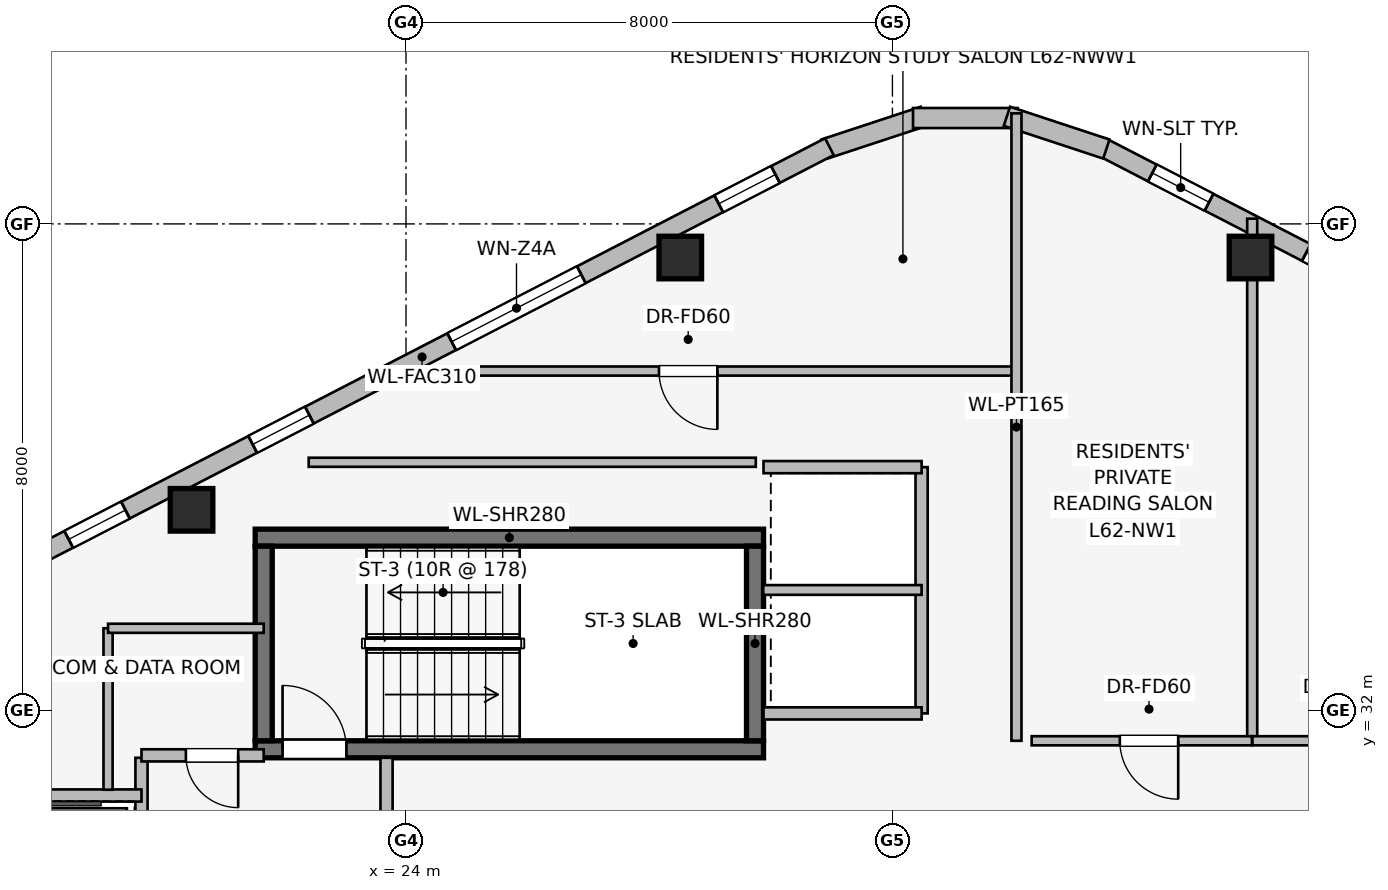
"""IFC4 building model, lengths in metres.
Left out: names, types, materials, properties, quantities, classifications, styles, units other than length and angle.
Written with IfcOpenShell. Run it as: python <this file> out.ifc"""

import sys

from ifc_helpers import new_model, si_unit, direction, frame, frame_2d, origin, origin_2d, place, context, subcontext, project, spatial, rectangle, extrude, element, fill, save


model = new_model("IFC4")
c1 = context("Model", 3, precision=1e-05, world=origin(), true_north=direction((0.0, 1.0)))
c2 = subcontext(c1, "Body", "Model", "MODEL_VIEW")
j1 = project(units=[si_unit("LENGTHUNIT", "METRE"), si_unit("PLANEANGLEUNIT", "RADIAN")], contexts=[c1])
p1 = place(None, origin())
s1 = spatial("IfcSite", under=j1, at=p1, CompositionType="ELEMENT")
p2 = place(p1, origin())
s2 = spatial("IfcBuilding", under=s1, at=p2, CompositionType="ELEMENT")
p3 = place(p2, frame((0.0, 0.0, 227.7)))
s3 = spatial("IfcBuildingStorey", under=s2, at=p3, CompositionType="ELEMENT", Elevation=227.7)
p4 = place(p3, frame((21.52, 31.36, 0.0), z_axis=(0.0, 0.0, 1.0), x_axis=(1.0, 0.0, 0.0)))
e1 = element("IfcWall", 1, at=p4, inside=s3, PredefinedType="SHEAR", context=c2, shape_type="SweptSolid", body=[
    extrude(rectangle(XDim=8.36, YDim=0.28, at=frame_2d((4.18, 0.0))), origin(), (0.0, 0.0, 1.0), 3.55),
])
p5 = place(p4, frame((0.45, 0.0, 0.0)))
e2 = element("IfcOpeningElement", 2, at=p5, cuts=e1, PredefinedType="OPENING", context=c2, shape_type="SweptSolid", body=[
    extrude(rectangle(XDim=1.05, YDim=2.0, at=frame_2d((0.525, 1.0))), frame((0.0, 0.15, 0.0), z_axis=(0.0, -1.0, 0.0), x_axis=(1.0, 0.0, 0.0)), (0.0, 0.0, 1.0), 0.3),
])
p6 = place(p3, frame((29.88, 34.84, 0.0), z_axis=(0.0, 0.0, 1.0), x_axis=(-1.0, 0.0, 0.0)))
e3 = element("IfcWall", 3, at=p6, inside=s3, PredefinedType="SHEAR", context=c2, shape_type="SweptSolid", body=[
    extrude(rectangle(XDim=8.36, YDim=0.28, at=frame_2d((4.18, 0.0))), origin(), (0.0, 0.0, 1.0), 3.55),
])
for number, where, z_axis, x_axis in (
    (4, (21.66, 34.7, 0.0), (0.0, 0.0, 1.0), (0.0, -1.0, 0.0)),
    (5, (29.74, 31.5, 0.0), (0.0, 0.0, 1.0), (0.0, 1.0, 0.0)),
):
    element("IfcWall", number, at=place(p3, frame(where, z_axis=z_axis, x_axis=x_axis)), inside=s3, PredefinedType="SHEAR", context=c2, shape_type="SweptSolid", body=[
        extrude(rectangle(XDim=3.2, YDim=0.28, at=frame_2d((1.6, 0.0))), origin(), (0.0, 0.0, 1.0), 3.55),
    ])
for number, where, z_axis, x_axis in (
    (6, (37.889, 39.447, 0.0), (0.0, 0.0, 1.0), (1.0, 0.0, 0.0)),
    (7, (28.511, 39.447, 0.0), (0.0, 0.0, 1.0), (1.0, 0.0, 0.0)),
    (8, (20.473, 35.298, 0.0), (0.0, 0.0, 1.0), (1.0, 0.0, 0.0)),
):
    element("IfcColumn", number, at=place(p3, frame(where, z_axis=z_axis, x_axis=x_axis)), inside=s3, PredefinedType="COLUMN", context=c2, shape_type="SweptSolid", body=[
        extrude(rectangle(XDim=0.7, YDim=0.7, at=origin_2d()), origin(), (0.0, 0.0, 1.0), 3.55),
    ])
p7 = place(p3, frame((35.437, 41.27, 0.0), z_axis=(0.0, 0.0, 1.0), x_axis=(0.888581481622, -0.458718814218, 0.0)))
e9 = element("IfcWall", 9, at=p7, inside=s3, PredefinedType="STANDARD", context=c2, shape_type="SweptSolid", body=[
    extrude(rectangle(XDim=15.077, YDim=0.31, at=frame_2d((7.539, 0.0))), origin(), (0.0, 0.0, 1.0), 3.29),
])
p8 = place(p7, frame((6.988, 0.0, 0.0)))
e10 = element("IfcOpeningElement", 10, at=p8, cuts=e9, PredefinedType="OPENING", context=c2, shape_type="SweptSolid", body=[
    extrude(rectangle(XDim=1.1, YDim=2.04, at=frame_2d((0.55, 1.02))), frame((0.0, 0.165, 0.0), z_axis=(0.0, -1.0, 0.0), x_axis=(1.0, 0.0, 0.0)), (0.0, 0.0, 1.0), 0.33),
])
p9 = place(p7, frame((0.942, 0.0, 0.75)))
e11 = element("IfcOpeningElement", 11, at=p9, cuts=e9, PredefinedType="OPENING", context=c2, shape_type="SweptSolid", body=[
    extrude(rectangle(XDim=1.05, YDim=1.4, at=frame_2d((0.525, 0.7))), frame((0.0, 0.165, 0.0), z_axis=(0.0, -1.0, 0.0), x_axis=(1.0, 0.0, 0.0)), (0.0, 0.0, 1.0), 0.33),
])
p10 = place(p7, frame((3.793, 0.0, 0.75)))
e12 = element("IfcOpeningElement", 12, at=p10, cuts=e9, PredefinedType="OPENING", context=c2, shape_type="SweptSolid", body=[
    extrude(rectangle(XDim=1.05, YDim=1.4, at=frame_2d((0.525, 0.7))), frame((0.0, 0.165, 0.0), z_axis=(0.0, -1.0, 0.0), x_axis=(1.0, 0.0, 0.0)), (0.0, 0.0, 1.0), 0.33),
])
p11 = place(p7, frame((5.36, 0.0, 0.75)))
e13 = element("IfcOpeningElement", 13, at=p11, cuts=e9, PredefinedType="OPENING", context=c2, shape_type="SweptSolid", body=[
    extrude(rectangle(XDim=1.05, YDim=1.4, at=frame_2d((0.525, 0.7))), frame((0.0, 0.165, 0.0), z_axis=(0.0, -1.0, 0.0), x_axis=(1.0, 0.0, 0.0)), (0.0, 0.0, 1.0), 0.33),
])
p12 = place(p7, frame((8.774, 0.0, 0.75)))
e14 = element("IfcOpeningElement", 14, at=p12, cuts=e9, PredefinedType="OPENING", context=c2, shape_type="SweptSolid", body=[
    extrude(rectangle(XDim=2.4, YDim=1.6, at=frame_2d((1.2, 0.8))), frame((0.0, 0.165, 0.0), z_axis=(0.0, -1.0, 0.0), x_axis=(1.0, 0.0, 0.0)), (0.0, 0.0, 1.0), 0.33),
])
p13 = place(p7, frame((13.029, 0.0, 0.75)))
e15 = element("IfcOpeningElement", 15, at=p13, cuts=e9, PredefinedType="OPENING", context=c2, shape_type="SweptSolid", body=[
    extrude(rectangle(XDim=1.05, YDim=1.4, at=frame_2d((0.525, 0.7))), frame((0.0, 0.165, 0.0), z_axis=(0.0, -1.0, 0.0), x_axis=(1.0, 0.0, 0.0)), (0.0, 0.0, 1.0), 0.33),
])
p14 = place(p3, frame((30.882, 41.231, 0.0), z_axis=(0.0, 0.0, 1.0), x_axis=(0.949713440491, 0.313120393699, 0.0)))
e16 = element("IfcWall", 16, at=p14, inside=s3, PredefinedType="STANDARD", context=c2, shape_type="SweptSolid", body=[
    extrude(rectangle(XDim=1.722, YDim=0.33, at=frame_2d((0.861, 0.0))), origin(), (0.0, 0.0, 1.0), 3.29),
])
p15 = place(p3, frame((32.339, 41.741, 0.0), z_axis=(0.0, 0.0, 1.0), x_axis=(1.0, 0.0, 0.0)))
e17 = element("IfcWall", 17, at=p15, inside=s3, PredefinedType="STANDARD", context=c2, shape_type="SweptSolid", body=[
    extrude(rectangle(XDim=1.722, YDim=0.33, at=frame_2d((0.861, 0.0))), origin(), (0.0, 0.0, 1.0), 3.29),
])
p16 = place(p3, frame((33.883, 41.77, 0.0), z_axis=(0.0, 0.0, 1.0), x_axis=(0.949713440491, -0.313120393699, 0.0)))
e18 = element("IfcWall", 18, at=p16, inside=s3, PredefinedType="STANDARD", context=c2, shape_type="SweptSolid", body=[
    extrude(rectangle(XDim=1.722, YDim=0.33, at=frame_2d((0.861, 0.0))), origin(), (0.0, 0.0, 1.0), 3.29),
])
p17 = place(p3, frame((17.566, 34.354, 0.0), z_axis=(0.0, 0.0, 1.0), x_axis=(0.888581481622, 0.458718814218, 0.0)))
e19 = element("IfcWall", 19, at=p17, inside=s3, PredefinedType="STANDARD", context=c2, shape_type="SweptSolid", body=[
    extrude(rectangle(XDim=15.077, YDim=0.31, at=frame_2d((7.539, 0.0))), origin(), (0.0, 0.0, 1.0), 3.29),
])
p18 = place(p17, frame((0.998, 0.0, 0.75)))
e20 = element("IfcOpeningElement", 20, at=p18, cuts=e19, PredefinedType="OPENING", context=c2, shape_type="SweptSolid", body=[
    extrude(rectangle(XDim=1.05, YDim=1.4, at=frame_2d((0.525, 0.7))), frame((0.0, 0.165, 0.0), z_axis=(0.0, -1.0, 0.0), x_axis=(1.0, 0.0, 0.0)), (0.0, 0.0, 1.0), 0.33),
])
p19 = place(p17, frame((4.403, 0.0, 0.75)))
e21 = element("IfcOpeningElement", 21, at=p19, cuts=e19, PredefinedType="OPENING", context=c2, shape_type="SweptSolid", body=[
    extrude(rectangle(XDim=1.05, YDim=1.4, at=frame_2d((0.525, 0.7))), frame((0.0, 0.165, 0.0), z_axis=(0.0, -1.0, 0.0), x_axis=(1.0, 0.0, 0.0)), (0.0, 0.0, 1.0), 0.33),
])
p20 = place(p17, frame((8.086, 0.0, 0.75)))
e22 = element("IfcOpeningElement", 22, at=p20, cuts=e19, PredefinedType="OPENING", context=c2, shape_type="SweptSolid", body=[
    extrude(rectangle(XDim=2.4, YDim=1.6, at=frame_2d((1.2, 0.8))), frame((0.0, 0.165, 0.0), z_axis=(0.0, -1.0, 0.0), x_axis=(1.0, 0.0, 0.0)), (0.0, 0.0, 1.0), 0.33),
])
p21 = place(p17, frame((13.029, 0.0, 0.75)))
e23 = element("IfcOpeningElement", 23, at=p21, cuts=e19, PredefinedType="OPENING", context=c2, shape_type="SweptSolid", body=[
    extrude(rectangle(XDim=1.05, YDim=1.4, at=frame_2d((0.525, 0.7))), frame((0.0, 0.165, 0.0), z_axis=(0.0, -1.0, 0.0), x_axis=(1.0, 0.0, 0.0)), (0.0, 0.0, 1.0), 0.33),
])
p22 = place(p3, frame((19.65, 25.68, 0.0), z_axis=(0.0, 0.0, 1.0), x_axis=(0.0, 1.0, 0.0)))
e24 = element("IfcWall", 24, at=p22, inside=s3, PredefinedType="PARTITIONING", context=c2, shape_type="SweptSolid", body=[
    extrude(rectangle(XDim=5.54, YDim=0.2, at=frame_2d((2.77, 0.0))), origin(), (0.0, 0.0, 1.0), 3.29),
])
p23 = place(p22, frame((0.62, 0.0, 0.0)))
e25 = element("IfcOpeningElement", 25, at=p23, cuts=e24, PredefinedType="OPENING", context=c2, shape_type="SweptSolid", body=[
    extrude(rectangle(XDim=1.1, YDim=2.2, at=frame_2d((0.55, 1.1))), frame((0.0, 0.11, 0.0), z_axis=(0.0, -1.0, 0.0), x_axis=(1.0, 0.0, 0.0)), (0.0, 0.0, 1.0), 0.22),
])
p24 = place(p22, frame((3.12, 0.0, 0.0)))
e26 = element("IfcOpeningElement", 26, at=p24, cuts=e24, PredefinedType="OPENING", context=c2, shape_type="SweptSolid", body=[
    extrude(rectangle(XDim=1.1, YDim=2.2, at=frame_2d((0.55, 1.1))), frame((0.0, 0.11, 0.0), z_axis=(0.0, -1.0, 0.0), x_axis=(1.0, 0.0, 0.0)), (0.0, 0.0, 1.0), 0.22),
])
p25 = place(p3, frame((23.68, 25.68, 0.0), z_axis=(0.0, 0.0, 1.0), x_axis=(0.0, 1.0, 0.0)))
e27 = element("IfcWall", 27, at=p25, inside=s3, PredefinedType="PARTITIONING", context=c2, shape_type="SweptSolid", body=[
    extrude(rectangle(XDim=5.54, YDim=0.2, at=frame_2d((2.77, 0.0))), origin(), (0.0, 0.0, 1.0), 3.29),
])
p26 = place(p25, frame((1.8, 0.0, 0.0)))
e28 = element("IfcOpeningElement", 28, at=p26, cuts=e27, PredefinedType="OPENING", context=c2, shape_type="SweptSolid", body=[
    extrude(rectangle(XDim=1.05, YDim=2.0, at=frame_2d((0.525, 1.0))), frame((0.0, 0.11, 0.0), z_axis=(0.0, -1.0, 0.0), x_axis=(1.0, 0.0, 0.0)), (0.0, 0.0, 1.0), 0.22),
])
p27 = place(p3, frame((21.66, 31.26, 0.0), z_axis=(0.0, 0.0, 1.0), x_axis=(-1.0, 0.0, 0.0)))
e29 = element("IfcWall", 29, at=p27, inside=s3, PredefinedType="PARTITIONING", context=c2, shape_type="SweptSolid", body=[
    extrude(rectangle(XDim=2.01, YDim=0.2, at=frame_2d((1.005, 0.0))), origin(), (0.0, 0.0, 1.0), 3.29),
])
p28 = place(p27, frame((0.42, 0.0, 0.0)))
e30 = element("IfcOpeningElement", 30, at=p28, cuts=e29, PredefinedType="OPENING", context=c2, shape_type="SweptSolid", body=[
    extrude(rectangle(XDim=0.86, YDim=2.0, at=frame_2d((0.43, 1.0))), frame((0.0, 0.11, 0.0), z_axis=(0.0, -1.0, 0.0), x_axis=(1.0, 0.0, 0.0)), (0.0, 0.0, 1.0), 0.22),
])
p29 = place(p3, frame((19.65, 30.6, 0.0), z_axis=(0.0, 0.0, 1.0), x_axis=(-1.0, 0.0, 0.0)))
e31 = element("IfcWall", 31, at=p29, inside=s3, PredefinedType="PARTITIONING", context=c2, shape_type="SweptSolid", body=[
    extrude(rectangle(XDim=2.5, YDim=0.2, at=frame_2d((1.25, 0.0))), origin(), (0.0, 0.0, 1.0), 2.19),
])
p30 = place(p3, frame((32.48, 31.95, 0.0), z_axis=(0.0, 0.0, 1.0), x_axis=(0.0, 1.0, 0.0)))
e32 = element("IfcWall", 32, at=p30, inside=s3, PredefinedType="PARTITIONING", context=c2, shape_type="SweptSolid", body=[
    extrude(rectangle(XDim=4.05, YDim=0.2, at=frame_2d((2.025, 0.0))), origin(), (0.0, 0.0, 1.0), 3.29),
])
for number, where, z_axis, x_axis in (
    (33, (29.88, 36.0, 0.0), (0.0, 0.0, 1.0), (1.0, 0.0, 0.0)),
    (34, (32.48, 31.95, 0.0), (0.0, 0.0, 1.0), (-1.0, 0.0, 0.0)),
):
    element("IfcWall", number, at=place(p3, frame(where, z_axis=z_axis, x_axis=x_axis)), inside=s3, PredefinedType="PARTITIONING", context=c2, shape_type="SweptSolid", body=[
        extrude(rectangle(XDim=2.6, YDim=0.2, at=frame_2d((1.3, 0.0))), origin(), (0.0, 0.0, 1.0), 3.29),
    ])
p31 = place(p3, frame((29.875, 33.98, 0.0), z_axis=(0.0, 0.0, 1.0), x_axis=(1.0, 0.0, 0.0)))
e35 = element("IfcWall", 35, at=p31, inside=s3, PredefinedType="PARTITIONING", context=c2, shape_type="SweptSolid", body=[
    extrude(rectangle(XDim=2.605, YDim=0.16, at=frame_2d((1.302, 0.0))), origin(), (0.0, 0.0, 1.0), 3.29),
])
p32 = place(p3, frame((19.1, 33.35, 0.0), z_axis=(0.0, 0.0, 1.0), x_axis=(0.0, -1.0, 0.0)))
e36 = element("IfcWall", 36, at=p32, inside=s3, PredefinedType="PARTITIONING", context=c2, shape_type="SweptSolid", body=[
    extrude(rectangle(XDim=2.655, YDim=0.15, at=frame_2d((1.328, 0.0))), origin(), (0.0, 0.0, 1.0), 3.29),
])
p33 = place(p3, frame((21.66, 33.35, 0.0), z_axis=(0.0, 0.0, 1.0), x_axis=(-1.0, 0.0, 0.0)))
e37 = element("IfcWall", 37, at=p33, inside=s3, PredefinedType="PARTITIONING", context=c2, shape_type="SweptSolid", body=[
    extrude(rectangle(XDim=2.56, YDim=0.15, at=frame_2d((1.28, 0.0))), origin(), (0.0, 0.0, 1.0), 3.29),
])
p34 = place(p3, frame((34.0, 37.58, 0.0), z_axis=(0.0, 0.0, 1.0), x_axis=(-1.0, 0.0, 0.0)))
e38 = element("IfcWall", 38, at=p34, inside=s3, PredefinedType="PARTITIONING", context=c2, shape_type="SweptSolid", body=[
    extrude(rectangle(XDim=10.501, YDim=0.15, at=frame_2d((5.25, 0.0))), origin(), (0.0, 0.0, 1.0), 2.682),
])
p35 = place(p34, frame((4.879, 0.0, 0.0)))
e39 = element("IfcOpeningElement", 39, at=p35, cuts=e38, PredefinedType="OPENING", context=c2, shape_type="SweptSolid", body=[
    extrude(rectangle(XDim=0.96, YDim=2.0, at=frame_2d((0.48, 1.0))), frame((0.0, 0.085, 0.0), z_axis=(0.0, -1.0, 0.0), x_axis=(1.0, 0.0, 0.0)), (0.0, 0.0, 1.0), 0.17),
])
p36 = place(p3, frame((34.04, 31.5, 0.0), z_axis=(0.0, 0.0, 1.0), x_axis=(0.0, 1.0, 0.0)))
e40 = element("IfcWall", 40, at=p36, inside=s3, PredefinedType="PARTITIONING", context=c2, shape_type="SweptSolid", body=[
    extrude(rectangle(XDim=10.318, YDim=0.165, at=frame_2d((5.159, 0.0))), origin(), (0.0, 0.0, 1.0), 3.29),
])
p37 = place(p3, frame((37.917, 31.51, 0.0), z_axis=(0.0, 0.0, 1.0), x_axis=(0.0, 1.0, 0.0)))
e41 = element("IfcWall", 41, at=p37, inside=s3, PredefinedType="PARTITIONING", context=c2, shape_type="SweptSolid", body=[
    extrude(rectangle(XDim=8.576, YDim=0.165, at=frame_2d((4.288, 0.0))), origin(), (0.0, 0.0, 1.0), 2.679),
])
p38 = place(p3, frame((37.912, 31.5, 0.0), z_axis=(0.0, 0.0, 1.0), x_axis=(-1.0, 0.0, 0.0)))
e42 = element("IfcWall", 42, at=p38, inside=s3, PredefinedType="PARTITIONING", context=c2, shape_type="SweptSolid", body=[
    extrude(rectangle(XDim=3.622, YDim=0.15, at=frame_2d((1.811, 0.0))), origin(), (0.0, 0.0, 1.0), 3.29),
])
p39 = place(p38, frame((1.212, 0.0, 0.0)))
e43 = element("IfcOpeningElement", 43, at=p39, cuts=e42, PredefinedType="OPENING", context=c2, shape_type="SweptSolid", body=[
    extrude(rectangle(XDim=0.96, YDim=2.0, at=frame_2d((0.48, 1.0))), frame((0.0, 0.085, 0.0), z_axis=(0.0, -1.0, 0.0), x_axis=(1.0, 0.0, 0.0)), (0.0, 0.0, 1.0), 0.17),
])
p40 = place(p3, frame((41.45, 31.5, 0.0), z_axis=(0.0, 0.0, 1.0), x_axis=(-1.0, 0.0, 0.0)))
e44 = element("IfcWall", 44, at=p40, inside=s3, PredefinedType="PARTITIONING", context=c2, shape_type="SweptSolid", body=[
    extrude(rectangle(XDim=3.528, YDim=0.15, at=frame_2d((1.764, 0.0))), origin(), (0.0, 0.0, 1.0), 3.29),
])
p41 = place(p40, frame((1.524, 0.0, 0.0)))
e45 = element("IfcOpeningElement", 45, at=p41, cuts=e44, PredefinedType="OPENING", context=c2, shape_type="SweptSolid", body=[
    extrude(rectangle(XDim=0.96, YDim=2.0, at=frame_2d((0.48, 1.0))), frame((0.0, 0.085, 0.0), z_axis=(0.0, -1.0, 0.0), x_axis=(1.0, 0.0, 0.0)), (0.0, 0.0, 1.0), 0.17),
])
p42 = place(p3, frame((29.753, 36.08, 0.0), z_axis=(0.0, 0.0, 1.0), x_axis=(-1.0, 0.0, 0.0)))
e46 = element("IfcWall", 46, at=p42, inside=s3, PredefinedType="PARTITIONING", context=c2, shape_type="SweptSolid", body=[
    extrude(rectangle(XDim=7.353, YDim=0.15, at=frame_2d((3.677, 0.0))), origin(), (0.0, 0.0, 1.0), 2.682),
])
p43 = place(p9, origin())
e47 = element("IfcWindow", 47, at=p43, inside=s3, PartitioningType="SINGLE_PANEL", PredefinedType="WINDOW", context=c2, shape_type="SweptSolid", body=[
    extrude(rectangle(XDim=1.05, YDim=1.4, at=frame_2d((0.525, 0.7))), frame((0.0, 0.03, 0.0), z_axis=(0.0, -1.0, 0.0), x_axis=(1.0, 0.0, 0.0)), (0.0, 0.0, 1.0), 0.06),
])
fill(e11, e47)
p44 = place(p10, origin())
e48 = element("IfcWindow", 48, at=p44, inside=s3, PartitioningType="SINGLE_PANEL", PredefinedType="WINDOW", context=c2, shape_type="SweptSolid", body=[
    extrude(rectangle(XDim=1.05, YDim=1.4, at=frame_2d((0.525, 0.7))), frame((0.0, 0.03, 0.0), z_axis=(0.0, -1.0, 0.0), x_axis=(1.0, 0.0, 0.0)), (0.0, 0.0, 1.0), 0.06),
])
fill(e12, e48)
p45 = place(p18, origin())
e49 = element("IfcWindow", 49, at=p45, inside=s3, PartitioningType="SINGLE_PANEL", PredefinedType="WINDOW", context=c2, shape_type="SweptSolid", body=[
    extrude(rectangle(XDim=1.05, YDim=1.4, at=frame_2d((0.525, 0.7))), frame((0.0, 0.03, 0.0), z_axis=(0.0, -1.0, 0.0), x_axis=(1.0, 0.0, 0.0)), (0.0, 0.0, 1.0), 0.06),
])
fill(e20, e49)
p46 = place(p19, origin())
e50 = element("IfcWindow", 50, at=p46, inside=s3, PartitioningType="SINGLE_PANEL", PredefinedType="WINDOW", context=c2, shape_type="SweptSolid", body=[
    extrude(rectangle(XDim=1.05, YDim=1.4, at=frame_2d((0.525, 0.7))), frame((0.0, 0.03, 0.0), z_axis=(0.0, -1.0, 0.0), x_axis=(1.0, 0.0, 0.0)), (0.0, 0.0, 1.0), 0.06),
])
fill(e21, e50)
p47 = place(p20, origin())
e51 = element("IfcWindow", 51, at=p47, inside=s3, PartitioningType="SINGLE_PANEL", PredefinedType="WINDOW", context=c2, shape_type="SweptSolid", body=[
    extrude(rectangle(XDim=2.4, YDim=1.6, at=frame_2d((1.2, 0.8))), frame((0.0, 0.03, 0.0), z_axis=(0.0, -1.0, 0.0), x_axis=(1.0, 0.0, 0.0)), (0.0, 0.0, 1.0), 0.06),
])
fill(e22, e51)
p48 = place(p21, origin())
e52 = element("IfcWindow", 52, at=p48, inside=s3, PartitioningType="SINGLE_PANEL", PredefinedType="WINDOW", context=c2, shape_type="SweptSolid", body=[
    extrude(rectangle(XDim=1.05, YDim=1.4, at=frame_2d((0.525, 0.7))), frame((0.0, 0.03, 0.0), z_axis=(0.0, -1.0, 0.0), x_axis=(1.0, 0.0, 0.0)), (0.0, 0.0, 1.0), 0.06),
])
fill(e23, e52)
p49 = place(p5, origin())
e53 = element("IfcDoor", 53, at=p49, inside=s3, OperationType="SINGLE_SWING_LEFT", PredefinedType="DOOR", context=c2, shape_type="SweptSolid", body=[
    extrude(rectangle(XDim=1.05, YDim=2.0, at=frame_2d((0.525, 1.0))), frame((0.0, 0.025, 0.0), z_axis=(0.0, -1.0, 0.0), x_axis=(1.0, 0.0, 0.0)), (0.0, 0.0, 1.0), 0.05),
])
fill(e2, e53)
p50 = place(p28, origin())
e54 = element("IfcDoor", 54, at=p50, inside=s3, OperationType="SINGLE_SWING_LEFT", PredefinedType="DOOR", context=c2, shape_type="SweptSolid", body=[
    extrude(rectangle(XDim=0.86, YDim=2.0, at=frame_2d((0.43, 1.0))), frame((0.0, 0.025, 0.0), z_axis=(0.0, -1.0, 0.0), x_axis=(1.0, 0.0, 0.0)), (0.0, 0.0, 1.0), 0.05),
])
fill(e30, e54)
p51 = place(p35, origin())
e55 = element("IfcDoor", 55, at=p51, inside=s3, OperationType="SINGLE_SWING_LEFT", PredefinedType="DOOR", context=c2, shape_type="SweptSolid", body=[
    extrude(rectangle(XDim=0.96, YDim=2.0, at=frame_2d((0.48, 1.0))), frame((0.0, 0.025, 0.0), z_axis=(0.0, -1.0, 0.0), x_axis=(1.0, 0.0, 0.0)), (0.0, 0.0, 1.0), 0.05),
])
fill(e39, e55)
p52 = place(p39, origin())
e56 = element("IfcDoor", 56, at=p52, inside=s3, OperationType="SINGLE_SWING_LEFT", PredefinedType="DOOR", context=c2, shape_type="SweptSolid", body=[
    extrude(rectangle(XDim=0.96, YDim=2.0, at=frame_2d((0.48, 1.0))), frame((0.0, 0.025, 0.0), z_axis=(0.0, -1.0, 0.0), x_axis=(1.0, 0.0, 0.0)), (0.0, 0.0, 1.0), 0.05),
])
fill(e43, e56)
save(model, sys.argv[1])
